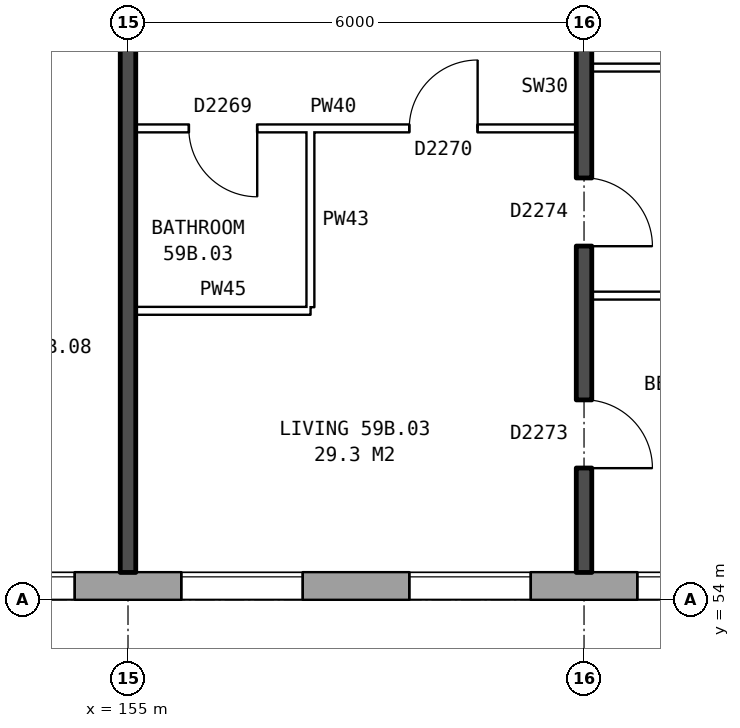
"""IFC4 building model, lengths in metres.
Left out: names, types, materials, properties, quantities, classifications, styles, units other than length and angle.
Written with IfcOpenShell. Run it as: python <this file> out.ifc"""

import sys

from ifc_helpers import new_model, si_unit, direction, frame, frame_2d, origin, place, context, subcontext, project, spatial, rectangle, extrude, element, fill, save


model = new_model("IFC4")
c1 = context("Model", 3, precision=1e-05, world=origin(), true_north=direction((0.0, 1.0)))
c2 = subcontext(c1, "Body", "Model", "MODEL_VIEW")
j1 = project(units=[si_unit("LENGTHUNIT", "METRE"), si_unit("PLANEANGLEUNIT", "RADIAN")], contexts=[c1])
p1 = place(None, origin())
s1 = spatial("IfcSite", under=j1, at=p1, CompositionType="ELEMENT")
p2 = place(p1, origin())
s2 = spatial("IfcBuilding", under=s1, at=p2, CompositionType="ELEMENT")
p3 = place(p2, frame((0.0, 0.0, 209.0)))
s3 = spatial("IfcBuildingStorey", under=s2, at=p3, CompositionType="ELEMENT", Elevation=209.0)
p4 = place(p3, frame((132.05, 54.18, 0.0), z_axis=(0.0, 0.0, 1.0), x_axis=(1.0, 0.0, 0.0)))
e1 = element("IfcWall", 1, at=p4, inside=s3, PredefinedType="STANDARD", context=c2, shape_type="SweptSolid", body=[
    extrude(rectangle(XDim=33.875, YDim=0.36, at=frame_2d((16.938, 0.0))), origin(), (0.0, 0.0, 1.0), 2.85),
])
p5 = place(p4, frame((0.3, 0.0, 0.8)))
e2 = element("IfcOpeningElement", 2, at=p5, cuts=e1, PredefinedType="OPENING", context=c2, shape_type="SweptSolid", body=[
    extrude(rectangle(XDim=1.4, YDim=1.8, at=frame_2d((0.7, 0.9))), frame((0.0, 0.19, 0.0), z_axis=(0.0, -1.0, 0.0), x_axis=(1.0, 0.0, 0.0)), (0.0, 0.0, 1.0), 0.38),
])
p6 = place(p4, frame((5.65, 0.0, 0.8)))
e3 = element("IfcOpeningElement", 3, at=p6, cuts=e1, PredefinedType="OPENING", context=c2, shape_type="SweptSolid", body=[
    extrude(rectangle(XDim=1.6, YDim=1.8, at=frame_2d((0.8, 0.9))), frame((0.0, 0.19, 0.0), z_axis=(0.0, -1.0, 0.0), x_axis=(1.0, 0.0, 0.0)), (0.0, 0.0, 1.0), 0.38),
])
p7 = place(p4, frame((8.65, 0.0, 0.8)))
e4 = element("IfcOpeningElement", 4, at=p7, cuts=e1, PredefinedType="OPENING", context=c2, shape_type="SweptSolid", body=[
    extrude(rectangle(XDim=1.6, YDim=1.8, at=frame_2d((0.8, 0.9))), frame((0.0, 0.19, 0.0), z_axis=(0.0, -1.0, 0.0), x_axis=(1.0, 0.0, 0.0)), (0.0, 0.0, 1.0), 0.38),
])
p8 = place(p4, frame((11.65, 0.0, 0.8)))
e5 = element("IfcOpeningElement", 5, at=p8, cuts=e1, PredefinedType="OPENING", context=c2, shape_type="SweptSolid", body=[
    extrude(rectangle(XDim=1.6, YDim=1.8, at=frame_2d((0.8, 0.9))), frame((0.0, 0.19, 0.0), z_axis=(0.0, -1.0, 0.0), x_axis=(1.0, 0.0, 0.0)), (0.0, 0.0, 1.0), 0.38),
])
p9 = place(p4, frame((14.65, 0.0, 0.8)))
e6 = element("IfcOpeningElement", 6, at=p9, cuts=e1, PredefinedType="OPENING", context=c2, shape_type="SweptSolid", body=[
    extrude(rectangle(XDim=1.6, YDim=1.8, at=frame_2d((0.8, 0.9))), frame((0.0, 0.19, 0.0), z_axis=(0.0, -1.0, 0.0), x_axis=(1.0, 0.0, 0.0)), (0.0, 0.0, 1.0), 0.38),
])
p10 = place(p4, frame((17.65, 0.0, 0.8)))
e7 = element("IfcOpeningElement", 7, at=p10, cuts=e1, PredefinedType="OPENING", context=c2, shape_type="SweptSolid", body=[
    extrude(rectangle(XDim=1.6, YDim=1.8, at=frame_2d((0.8, 0.9))), frame((0.0, 0.19, 0.0), z_axis=(0.0, -1.0, 0.0), x_axis=(1.0, 0.0, 0.0)), (0.0, 0.0, 1.0), 0.38),
])
p11 = place(p4, frame((20.65, 0.0, 0.8)))
e8 = element("IfcOpeningElement", 8, at=p11, cuts=e1, PredefinedType="OPENING", context=c2, shape_type="SweptSolid", body=[
    extrude(rectangle(XDim=1.6, YDim=1.8, at=frame_2d((0.8, 0.9))), frame((0.0, 0.19, 0.0), z_axis=(0.0, -1.0, 0.0), x_axis=(1.0, 0.0, 0.0)), (0.0, 0.0, 1.0), 0.38),
])
p12 = place(p4, frame((23.65, 0.0, 0.8)))
e9 = element("IfcOpeningElement", 9, at=p12, cuts=e1, PredefinedType="OPENING", context=c2, shape_type="SweptSolid", body=[
    extrude(rectangle(XDim=1.6, YDim=1.8, at=frame_2d((0.8, 0.9))), frame((0.0, 0.19, 0.0), z_axis=(0.0, -1.0, 0.0), x_axis=(1.0, 0.0, 0.0)), (0.0, 0.0, 1.0), 0.38),
])
p13 = place(p4, frame((26.65, 0.0, 0.8)))
e10 = element("IfcOpeningElement", 10, at=p13, cuts=e1, PredefinedType="OPENING", context=c2, shape_type="SweptSolid", body=[
    extrude(rectangle(XDim=1.6, YDim=1.8, at=frame_2d((0.8, 0.9))), frame((0.0, 0.19, 0.0), z_axis=(0.0, -1.0, 0.0), x_axis=(1.0, 0.0, 0.0)), (0.0, 0.0, 1.0), 0.38),
])
p14 = place(p4, frame((29.65, 0.0, 0.8)))
e11 = element("IfcOpeningElement", 11, at=p14, cuts=e1, PredefinedType="OPENING", context=c2, shape_type="SweptSolid", body=[
    extrude(rectangle(XDim=1.6, YDim=1.8, at=frame_2d((0.8, 0.9))), frame((0.0, 0.19, 0.0), z_axis=(0.0, -1.0, 0.0), x_axis=(1.0, 0.0, 0.0)), (0.0, 0.0, 1.0), 0.38),
])
p15 = place(p4, frame((2.0, 0.0, 0.9)))
e12 = element("IfcOpeningElement", 12, at=p15, cuts=e1, PredefinedType="OPENING", context=c2, shape_type="SweptSolid", body=[
    extrude(rectangle(XDim=0.8, YDim=1.5, at=frame_2d((0.4, 0.75))), frame((0.0, 0.19, 0.0), z_axis=(0.0, -1.0, 0.0), x_axis=(1.0, 0.0, 0.0)), (0.0, 0.0, 1.0), 0.38),
])
p16 = place(p3, frame((155.1, 57.8, 0.0), z_axis=(0.0, 0.0, 1.0), x_axis=(1.0, 0.0, 0.0)))
e13 = element("IfcWall", 13, at=p16, inside=s3, PredefinedType="PARTITIONING", context=c2, shape_type="SweptSolid", body=[
    extrude(rectangle(XDim=2.3, YDim=0.1, at=frame_2d((1.15, 0.0))), origin(), (0.0, 0.0, 1.0), 2.85),
])
p17 = place(p3, frame((161.1, 58.0, 0.0), z_axis=(0.0, 0.0, 1.0), x_axis=(1.0, 0.0, 0.0)))
e14 = element("IfcWall", 14, at=p17, inside=s3, PredefinedType="PARTITIONING", context=c2, shape_type="SweptSolid", body=[
    extrude(rectangle(XDim=7.54, YDim=0.1, at=frame_2d((3.77, 0.0))), origin(), (0.0, 0.0, 1.0), 2.85),
])
p18 = place(p3, frame((155.1, 60.2, 0.0), z_axis=(0.0, 0.0, 1.0), x_axis=(1.0, 0.0, 0.0)))
e15 = element("IfcWall", 15, at=p18, inside=s3, PredefinedType="PARTITIONING", context=c2, shape_type="SweptSolid", body=[
    extrude(rectangle(XDim=5.8, YDim=0.1, at=frame_2d((2.9, 0.0))), origin(), (0.0, 0.0, 1.0), 2.85),
])
p19 = place(p18, frame((3.6, 0.0, 0.0)))
e16 = element("IfcOpeningElement", 16, at=p19, cuts=e15, PredefinedType="OPENING", context=c2, shape_type="SweptSolid", body=[
    extrude(rectangle(XDim=0.9, YDim=2.1, at=frame_2d((0.45, 1.05))), frame((0.0, 0.06, 0.0), z_axis=(0.0, -1.0, 0.0), x_axis=(1.0, 0.0, 0.0)), (0.0, 0.0, 1.0), 0.12),
])
p20 = place(p18, frame((0.7, 0.0, 0.0)))
e17 = element("IfcOpeningElement", 17, at=p20, cuts=e15, PredefinedType="OPENING", context=c2, shape_type="SweptSolid", body=[
    extrude(rectangle(XDim=0.9, YDim=2.1, at=frame_2d((0.45, 1.05))), frame((0.0, 0.06, 0.0), z_axis=(0.0, -1.0, 0.0), x_axis=(1.0, 0.0, 0.0)), (0.0, 0.0, 1.0), 0.12),
])
p21 = place(p3, frame((161.1, 61.0, 0.0), z_axis=(0.0, 0.0, 1.0), x_axis=(1.0, 0.0, 0.0)))
e18 = element("IfcWall", 18, at=p21, inside=s3, PredefinedType="PARTITIONING", context=c2, shape_type="SweptSolid", body=[
    extrude(rectangle(XDim=7.54, YDim=0.1, at=frame_2d((3.77, 0.0))), origin(), (0.0, 0.0, 1.0), 2.85),
])
p22 = place(p3, frame((155.0, 54.36, 0.0), z_axis=(0.0, 0.0, 1.0), x_axis=(0.0, 1.0, 0.0)))
e19 = element("IfcWall", 19, at=p22, inside=s3, PredefinedType="SOLIDWALL", context=c2, shape_type="SweptSolid", body=[
    extrude(rectangle(XDim=14.44, YDim=0.2, at=frame_2d((7.22, 0.0))), origin(), (0.0, 0.0, 1.0), 2.85),
])
p23 = place(p3, frame((157.4, 57.85, 0.0), z_axis=(0.0, 0.0, 1.0), x_axis=(0.0, 1.0, 0.0)))
e20 = element("IfcWall", 20, at=p23, inside=s3, PredefinedType="PARTITIONING", context=c2, shape_type="SweptSolid", body=[
    extrude(rectangle(XDim=2.3, YDim=0.1, at=frame_2d((1.15, 0.0))), origin(), (0.0, 0.0, 1.0), 2.85),
])
p24 = place(p3, frame((161.0, 54.36, 0.0), z_axis=(0.0, 0.0, 1.0), x_axis=(0.0, 1.0, 0.0)))
e21 = element("IfcWall", 21, at=p24, inside=s3, PredefinedType="SOLIDWALL", context=c2, shape_type="SweptSolid", body=[
    extrude(rectangle(XDim=9.44, YDim=0.2, at=frame_2d((4.72, 0.0))), origin(), (0.0, 0.0, 1.0), 2.85),
])
p25 = place(p24, frame((1.37, 0.0, 0.0)))
e22 = element("IfcOpeningElement", 22, at=p25, cuts=e21, PredefinedType="OPENING", context=c2, shape_type="SweptSolid", body=[
    extrude(rectangle(XDim=0.9, YDim=2.1, at=frame_2d((0.45, 1.05))), frame((0.0, 0.11, 0.0), z_axis=(0.0, -1.0, 0.0), x_axis=(1.0, 0.0, 0.0)), (0.0, 0.0, 1.0), 0.22),
])
p26 = place(p24, frame((4.29, 0.0, 0.0)))
e23 = element("IfcOpeningElement", 23, at=p26, cuts=e21, PredefinedType="OPENING", context=c2, shape_type="SweptSolid", body=[
    extrude(rectangle(XDim=0.9, YDim=2.1, at=frame_2d((0.45, 1.05))), frame((0.0, 0.11, 0.0), z_axis=(0.0, -1.0, 0.0), x_axis=(1.0, 0.0, 0.0)), (0.0, 0.0, 1.0), 0.22),
])
p27 = place(p24, frame((7.59, 0.0, 0.0)))
e24 = element("IfcOpeningElement", 24, at=p27, cuts=e21, PredefinedType="OPENING", context=c2, shape_type="SweptSolid", body=[
    extrude(rectangle(XDim=0.9, YDim=2.1, at=frame_2d((0.45, 1.05))), frame((0.0, 0.11, 0.0), z_axis=(0.0, -1.0, 0.0), x_axis=(1.0, 0.0, 0.0)), (0.0, 0.0, 1.0), 0.22),
])
p28 = place(p11, origin())
e25 = element("IfcWindow", 25, at=p28, inside=s3, PartitioningType="SINGLE_PANEL", PredefinedType="WINDOW", context=c2, shape_type="SweptSolid", body=[
    extrude(rectangle(XDim=1.6, YDim=1.8, at=frame_2d((0.8, 0.9))), frame((0.0, 0.15, 0.0), z_axis=(0.0, -1.0, 0.0), x_axis=(1.0, 0.0, 0.0)), (0.0, 0.0, 1.0), 0.06),
])
fill(e8, e25)
p29 = place(p12, origin())
e26 = element("IfcWindow", 26, at=p29, inside=s3, PartitioningType="SINGLE_PANEL", PredefinedType="WINDOW", context=c2, shape_type="SweptSolid", body=[
    extrude(rectangle(XDim=1.6, YDim=1.8, at=frame_2d((0.8, 0.9))), frame((0.0, 0.15, 0.0), z_axis=(0.0, -1.0, 0.0), x_axis=(1.0, 0.0, 0.0)), (0.0, 0.0, 1.0), 0.06),
])
fill(e9, e26)
p30 = place(p13, origin())
e27 = element("IfcWindow", 27, at=p30, inside=s3, PartitioningType="SINGLE_PANEL", PredefinedType="WINDOW", context=c2, shape_type="SweptSolid", body=[
    extrude(rectangle(XDim=1.6, YDim=1.8, at=frame_2d((0.8, 0.9))), frame((0.0, 0.15, 0.0), z_axis=(0.0, -1.0, 0.0), x_axis=(1.0, 0.0, 0.0)), (0.0, 0.0, 1.0), 0.06),
])
fill(e10, e27)
p31 = place(p14, origin())
e28 = element("IfcWindow", 28, at=p31, inside=s3, PartitioningType="SINGLE_PANEL", PredefinedType="WINDOW", context=c2, shape_type="SweptSolid", body=[
    extrude(rectangle(XDim=1.6, YDim=1.8, at=frame_2d((0.8, 0.9))), frame((0.0, 0.15, 0.0), z_axis=(0.0, -1.0, 0.0), x_axis=(1.0, 0.0, 0.0)), (0.0, 0.0, 1.0), 0.06),
])
fill(e11, e28)
p32 = place(p25, frame((0.9, 0.0, 0.0), z_axis=(0.0, 0.0, 1.0), x_axis=(-1.0, 0.0, 0.0)))
e29 = element("IfcDoor", 29, at=p32, inside=s3, OperationType="SINGLE_SWING_RIGHT", PredefinedType="DOOR", context=c2, shape_type="SweptSolid", body=[
    extrude(rectangle(XDim=0.9, YDim=2.1, at=frame_2d((0.45, 1.05))), frame((0.0, 0.025, 0.0), z_axis=(0.0, -1.0, 0.0), x_axis=(1.0, 0.0, 0.0)), (0.0, 0.0, 1.0), 0.05),
])
fill(e22, e29)
p33 = place(p26, frame((0.9, 0.0, 0.0), z_axis=(0.0, 0.0, 1.0), x_axis=(-1.0, 0.0, 0.0)))
e30 = element("IfcDoor", 30, at=p33, inside=s3, OperationType="SINGLE_SWING_RIGHT", PredefinedType="DOOR", context=c2, shape_type="SweptSolid", body=[
    extrude(rectangle(XDim=0.9, YDim=2.1, at=frame_2d((0.45, 1.05))), frame((0.0, 0.025, 0.0), z_axis=(0.0, -1.0, 0.0), x_axis=(1.0, 0.0, 0.0)), (0.0, 0.0, 1.0), 0.05),
])
fill(e23, e30)
p34 = place(p19, origin())
e31 = element("IfcDoor", 31, at=p34, inside=s3, OperationType="SINGLE_SWING_RIGHT", PredefinedType="DOOR", context=c2, shape_type="SweptSolid", body=[
    extrude(rectangle(XDim=0.9, YDim=2.1, at=frame_2d((0.45, 1.05))), frame((0.0, 0.025, 0.0), z_axis=(0.0, -1.0, 0.0), x_axis=(1.0, 0.0, 0.0)), (0.0, 0.0, 1.0), 0.05),
])
fill(e16, e31)
p35 = place(p20, frame((0.9, 0.0, 0.0), z_axis=(0.0, 0.0, 1.0), x_axis=(-1.0, 0.0, 0.0)))
e32 = element("IfcDoor", 32, at=p35, inside=s3, OperationType="SINGLE_SWING_LEFT", PredefinedType="DOOR", context=c2, shape_type="SweptSolid", body=[
    extrude(rectangle(XDim=0.9, YDim=2.1, at=frame_2d((0.45, 1.05))), frame((0.0, 0.025, 0.0), z_axis=(0.0, -1.0, 0.0), x_axis=(1.0, 0.0, 0.0)), (0.0, 0.0, 1.0), 0.05),
])
fill(e17, e32)
save(model, sys.argv[1])
